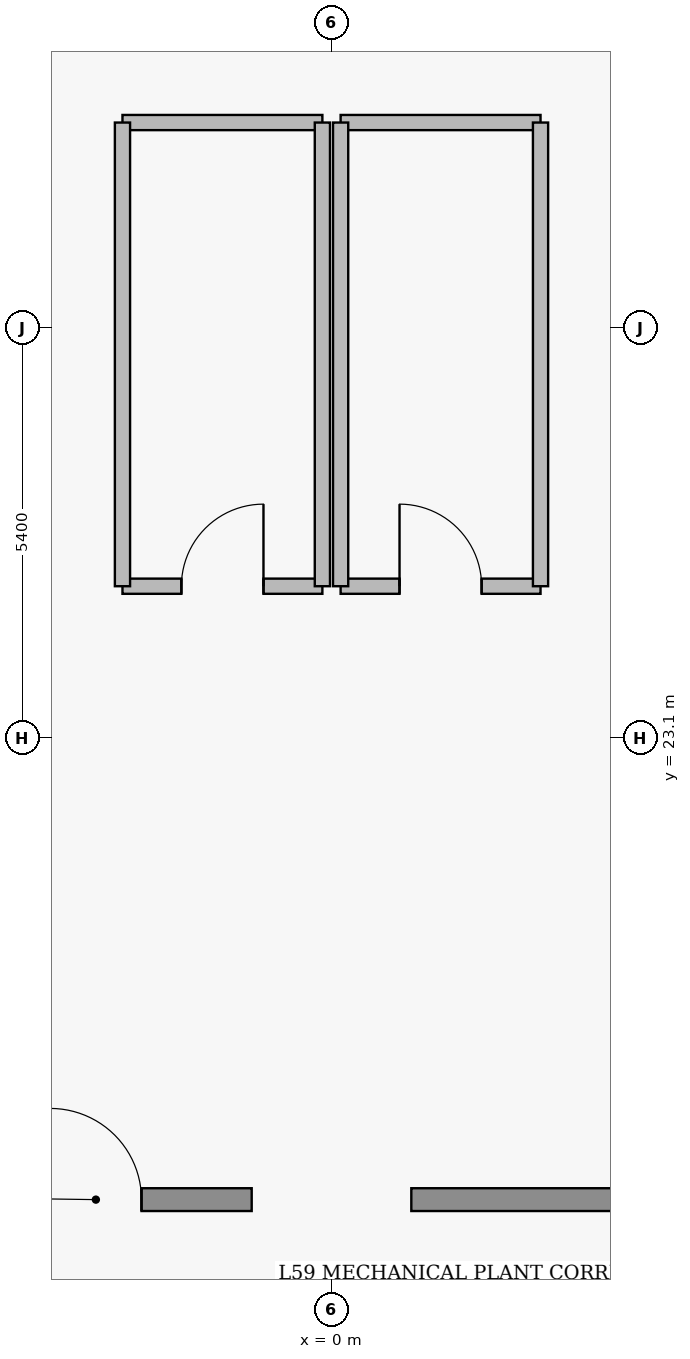
"""IFC4 building model, lengths in metres.
Left out: names, types, materials, properties, quantities, classifications, styles, units other than length and angle.
Written with IfcOpenShell. Run it as: python <this file> out.ifc"""

import sys

from ifc_helpers import new_model, si_unit, direction, frame, frame_2d, origin, place, context, subcontext, project, spatial, rectangle, extrude, element, fill, save


model = new_model("IFC4")
c1 = context("Model", 3, precision=1e-05, world=origin(), true_north=direction((0.0, 1.0)))
c2 = subcontext(c1, "Body", "Model", "MODEL_VIEW")
j1 = project(units=[si_unit("LENGTHUNIT", "METRE"), si_unit("PLANEANGLEUNIT", "RADIAN")], contexts=[c1])
p1 = place(None, origin())
s1 = spatial("IfcSite", under=j1, at=p1, CompositionType="ELEMENT")
p2 = place(p1, origin())
s2 = spatial("IfcBuilding", under=s1, at=p2, CompositionType="ELEMENT")
p3 = place(p2, frame((0.0, 0.0, 233.65)))
s3 = spatial("IfcBuildingStorey", under=s2, at=p3, CompositionType="ELEMENT", Elevation=233.65)
p4 = place(p3, frame((-6.2, 17.03, 0.0), z_axis=(0.0, 0.0, 1.0), x_axis=(1.0, 0.0, 0.0)))
e1 = element("IfcWall", 1, at=p4, inside=s3, PredefinedType="STANDARD", context=c2, shape_type="SweptSolid", body=[
    extrude(rectangle(XDim=5.15, YDim=0.3, at=frame_2d((2.575, 0.0))), origin(), (0.0, 0.0, 1.0), 5.74),
])
p5 = place(p4, frame((2.5, 0.0, 0.0)))
e2 = element("IfcOpeningElement", 2, at=p5, cuts=e1, PredefinedType="OPENING", context=c2, shape_type="SweptSolid", body=[
    extrude(rectangle(XDim=1.2, YDim=2.2, at=frame_2d((0.6, 1.1))), frame((0.0, 0.16, 0.0), z_axis=(0.0, -1.0, 0.0), x_axis=(1.0, 0.0, 0.0)), (0.0, 0.0, 1.0), 0.32),
])
p6 = place(p3, frame((1.05, 17.03, 0.0), z_axis=(0.0, 0.0, 1.0), x_axis=(1.0, 0.0, 0.0)))
e3 = element("IfcWall", 3, at=p6, inside=s3, PredefinedType="STANDARD", context=c2, shape_type="SweptSolid", body=[
    extrude(rectangle(XDim=5.15, YDim=0.3, at=frame_2d((2.575, 0.0))), origin(), (0.0, 0.0, 1.0), 5.74),
])
p7 = place(p3, frame((-2.75, 25.1, 0.0), z_axis=(0.0, 0.0, 1.0), x_axis=(1.0, 0.0, 0.0)))
e4 = element("IfcWall", 4, at=p7, inside=s3, PredefinedType="PARTITIONING", context=c2, shape_type="SweptSolid", body=[
    extrude(rectangle(XDim=2.63, YDim=0.2, at=frame_2d((1.315, 0.0))), origin(), (0.0, 0.0, 1.0), 5.336),
])
p8 = place(p7, frame((0.775, 0.0, 0.0)))
e5 = element("IfcOpeningElement", 5, at=p8, cuts=e4, PredefinedType="OPENING", context=c2, shape_type="SweptSolid", body=[
    extrude(rectangle(XDim=1.08, YDim=2.18, at=frame_2d((0.54, 1.09))), frame((0.0, 0.11, 0.0), z_axis=(0.0, -1.0, 0.0), x_axis=(1.0, 0.0, 0.0)), (0.0, 0.0, 1.0), 0.22),
])
p9 = place(p3, frame((0.12, 25.1, 0.0), z_axis=(0.0, 0.0, 1.0), x_axis=(1.0, 0.0, 0.0)))
e6 = element("IfcWall", 6, at=p9, inside=s3, PredefinedType="PARTITIONING", context=c2, shape_type="SweptSolid", body=[
    extrude(rectangle(XDim=2.63, YDim=0.2, at=frame_2d((1.315, 0.0))), origin(), (0.0, 0.0, 1.0), 5.336),
])
p10 = place(p9, frame((0.775, 0.0, 0.0)))
e7 = element("IfcOpeningElement", 7, at=p10, cuts=e6, PredefinedType="OPENING", context=c2, shape_type="SweptSolid", body=[
    extrude(rectangle(XDim=1.08, YDim=2.18, at=frame_2d((0.54, 1.09))), frame((0.0, 0.11, 0.0), z_axis=(0.0, -1.0, 0.0), x_axis=(1.0, 0.0, 0.0)), (0.0, 0.0, 1.0), 0.22),
])
p11 = place(p3, frame((-2.75, 31.2, 0.0), z_axis=(0.0, 0.0, 1.0), x_axis=(1.0, 0.0, 0.0)))
e8 = element("IfcWall", 8, at=p11, inside=s3, PredefinedType="PARTITIONING", context=c2, shape_type="SweptSolid", body=[
    extrude(rectangle(XDim=2.63, YDim=0.2, at=frame_2d((1.315, 0.0))), origin(), (0.0, 0.0, 1.0), 5.74),
])
for number, where, z_axis, x_axis in (
    (9, (-2.75, 25.1, 0.0), (0.0, 0.0, 1.0), (0.0, 1.0, 0.0)),
    (10, (-0.12, 25.1, 0.0), (0.0, 0.0, 1.0), (0.0, 1.0, 0.0)),
):
    element("IfcWall", number, at=place(p3, frame(where, z_axis=z_axis, x_axis=x_axis)), inside=s3, PredefinedType="PARTITIONING", context=c2, shape_type="SweptSolid", body=[
        extrude(rectangle(XDim=6.1, YDim=0.2, at=frame_2d((3.05, 0.0))), origin(), (0.0, 0.0, 1.0), 5.74),
    ])
p12 = place(p3, frame((0.12, 31.2, 0.0), z_axis=(0.0, 0.0, 1.0), x_axis=(1.0, 0.0, 0.0)))
e11 = element("IfcWall", 11, at=p12, inside=s3, PredefinedType="PARTITIONING", context=c2, shape_type="SweptSolid", body=[
    extrude(rectangle(XDim=2.63, YDim=0.2, at=frame_2d((1.315, 0.0))), origin(), (0.0, 0.0, 1.0), 5.74),
])
for number, where, z_axis, x_axis in (
    (12, (0.12, 25.1, 0.0), (0.0, 0.0, 1.0), (0.0, 1.0, 0.0)),
    (13, (2.75, 25.1, 0.0), (0.0, 0.0, 1.0), (0.0, 1.0, 0.0)),
):
    element("IfcWall", number, at=place(p3, frame(where, z_axis=z_axis, x_axis=x_axis)), inside=s3, PredefinedType="PARTITIONING", context=c2, shape_type="SweptSolid", body=[
        extrude(rectangle(XDim=6.1, YDim=0.2, at=frame_2d((3.05, 0.0))), origin(), (0.0, 0.0, 1.0), 5.74),
    ])
p13 = place(p5, origin())
e14 = element("IfcDoor", 14, at=p13, inside=s3, OperationType="SINGLE_SWING_LEFT", PredefinedType="DOOR", context=c2, shape_type="SweptSolid", body=[
    extrude(rectangle(XDim=1.2, YDim=2.2, at=frame_2d((0.6, 1.1))), frame((0.0, 0.025, 0.0), z_axis=(0.0, -1.0, 0.0), x_axis=(1.0, 0.0, 0.0)), (0.0, 0.0, 1.0), 0.05),
])
fill(e2, e14)
p14 = place(p8, origin())
e15 = element("IfcDoor", 15, at=p14, inside=s3, OperationType="SINGLE_SWING_RIGHT", PredefinedType="DOOR", context=c2, shape_type="SweptSolid", body=[
    extrude(rectangle(XDim=1.08, YDim=2.18, at=frame_2d((0.54, 1.09))), frame((0.0, 0.025, 0.0), z_axis=(0.0, -1.0, 0.0), x_axis=(1.0, 0.0, 0.0)), (0.0, 0.0, 1.0), 0.05),
])
fill(e5, e15)
p15 = place(p10, origin())
e16 = element("IfcDoor", 16, at=p15, inside=s3, OperationType="SINGLE_SWING_LEFT", PredefinedType="DOOR", context=c2, shape_type="SweptSolid", body=[
    extrude(rectangle(XDim=1.08, YDim=2.18, at=frame_2d((0.54, 1.09))), frame((0.0, 0.025, 0.0), z_axis=(0.0, -1.0, 0.0), x_axis=(1.0, 0.0, 0.0)), (0.0, 0.0, 1.0), 0.05),
])
fill(e7, e16)
save(model, sys.argv[1])
